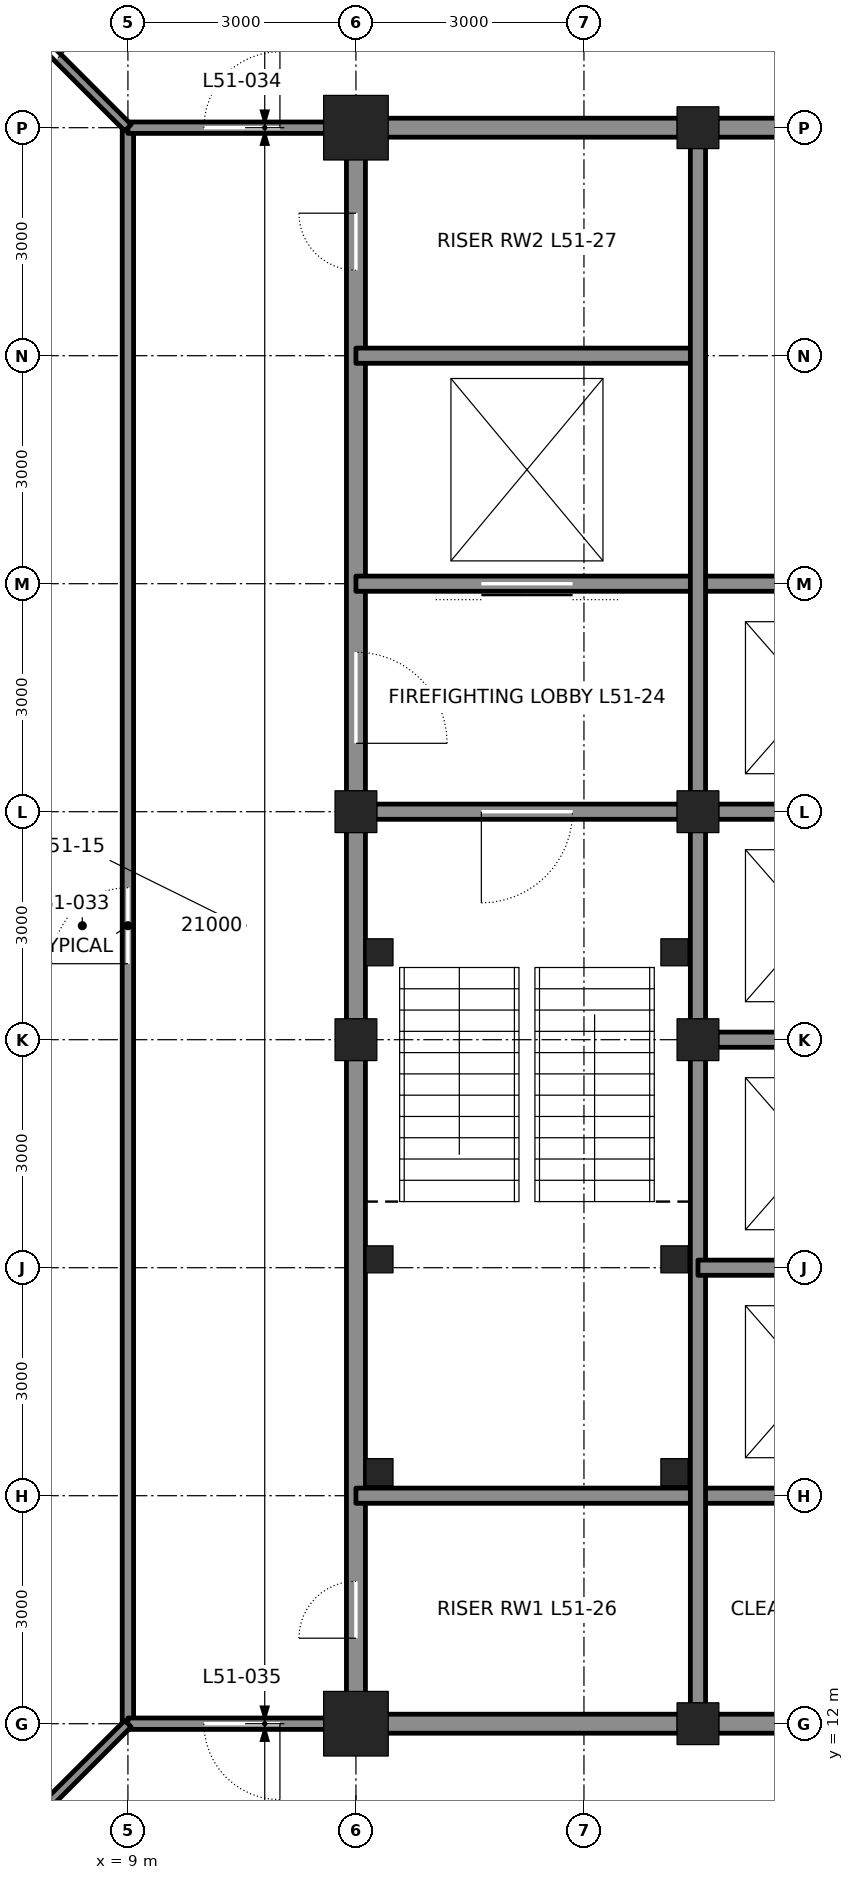
"""IFC4 building model, lengths in metres.
Left out: names, types, materials, properties, quantities, classifications, styles, units other than length and angle.
Written with IfcOpenShell. Run it as: python <this file> out.ifc"""

import sys

from ifc_helpers import new_model, si_unit, direction, frame, frame_2d, origin, origin_2d, place, context, subcontext, project, spatial, rectangle, hollow_rectangle, extrude, element, fill, save


model = new_model("IFC4")
c1 = context("Model", 3, precision=1e-05, world=origin(), true_north=direction((0.0, 1.0)))
c2 = subcontext(c1, "Body", "Model", "MODEL_VIEW")
j1 = project(units=[si_unit("LENGTHUNIT", "METRE"), si_unit("PLANEANGLEUNIT", "RADIAN")], contexts=[c1])
p1 = place(None, origin())
s1 = spatial("IfcSite", under=j1, at=p1, CompositionType="ELEMENT")
p2 = place(p1, origin())
s2 = spatial("IfcBuilding", under=s1, at=p2, CompositionType="ELEMENT")
p3 = place(p2, frame((0.0, 0.0, 230.7)))
s3 = spatial("IfcBuildingStorey", under=s2, at=p3, CompositionType="ELEMENT", Elevation=230.7)
p4 = place(p3, frame((12.0, 12.0, 0.0), z_axis=(0.0, 0.0, 1.0), x_axis=(1.0, 0.0, 0.0)))
e1 = element("IfcColumn", 1, at=p4, inside=s3, PredefinedType="COLUMN", context=c2, shape_type="SweptSolid", body=[
    extrude(hollow_rectangle(XDim=0.85, YDim=0.85, WallThickness=0.085, at=origin_2d()), origin(), (0.0, 0.0, 1.0), 4.2),
])
p5 = place(p3, frame((16.5, 12.0, 0.0), z_axis=(0.0, 0.0, 1.0), x_axis=(1.0, 0.0, 0.0)))
e2 = element("IfcColumn", 2, at=p5, inside=s3, PredefinedType="COLUMN", context=c2, shape_type="SweptSolid", body=[
    extrude(hollow_rectangle(XDim=0.55, YDim=0.55, WallThickness=0.045, at=origin_2d()), origin(), (0.0, 0.0, 1.0), 4.2),
])
p6 = place(p3, frame((12.0, 33.0, 0.0), z_axis=(0.0, 0.0, 1.0), x_axis=(1.0, 0.0, 0.0)))
e3 = element("IfcColumn", 3, at=p6, inside=s3, PredefinedType="COLUMN", context=c2, shape_type="SweptSolid", body=[
    extrude(hollow_rectangle(XDim=0.85, YDim=0.85, WallThickness=0.085, at=origin_2d()), origin(), (0.0, 0.0, 1.0), 4.2),
])
for number, where, z_axis, x_axis in (
    (4, (16.5, 33.0, 0.0), (0.0, 0.0, 1.0), (1.0, 0.0, 0.0)),
    (5, (12.0, 21.0, 0.0), (0.0, 0.0, 1.0), (1.0, 0.0, 0.0)),
    (6, (12.0, 24.0, 0.0), (0.0, 0.0, 1.0), (1.0, 0.0, 0.0)),
    (7, (16.5, 21.0, 0.0), (0.0, 0.0, 1.0), (1.0, 0.0, 0.0)),
    (8, (16.5, 24.0, 0.0), (0.0, 0.0, 1.0), (1.0, 0.0, 0.0)),
):
    element("IfcColumn", number, at=place(p3, frame(where, z_axis=z_axis, x_axis=x_axis)), inside=s3, PredefinedType="COLUMN", context=c2, shape_type="SweptSolid", body=[
        extrude(hollow_rectangle(XDim=0.55, YDim=0.55, WallThickness=0.045, at=origin_2d()), origin(), (0.0, 0.0, 1.0), 4.2),
    ])
p7 = place(p3, frame((12.0, 12.25, 0.0), z_axis=(0.0, 0.0, 1.0), x_axis=(0.0, 1.0, 0.0)))
e9 = element("IfcWall", 9, at=p7, inside=s3, PredefinedType="SOLIDWALL", context=c2, shape_type="SweptSolid", body=[
    extrude(rectangle(XDim=8.5, YDim=0.25, at=frame_2d((4.25, 0.0))), origin(), (0.0, 0.0, 1.0), 3.113),
])
p8 = place(p7, frame((0.875, 0.0, 0.0)))
e10 = element("IfcOpeningElement", 10, at=p8, cuts=e9, PredefinedType="OPENING", context=c2, shape_type="SweptSolid", body=[
    extrude(rectangle(XDim=0.75, YDim=2.1, at=frame_2d((0.375, 1.05))), frame((0.0, 0.135, 0.0), z_axis=(0.0, -1.0, 0.0), x_axis=(1.0, 0.0, 0.0)), (0.0, 0.0, 1.0), 0.27),
])
p9 = place(p3, frame((12.0, 21.25, 0.0), z_axis=(0.0, 0.0, 1.0), x_axis=(0.0, 1.0, 0.0)))
e11 = element("IfcWall", 11, at=p9, inside=s3, PredefinedType="SOLIDWALL", context=c2, shape_type="SweptSolid", body=[
    extrude(rectangle(XDim=2.5, YDim=0.25, at=frame_2d((1.25, 0.0))), origin(), (0.0, 0.0, 1.0), 3.113),
])
p10 = place(p3, frame((12.0, 24.25, 0.0), z_axis=(0.0, 0.0, 1.0), x_axis=(0.0, 1.0, 0.0)))
e12 = element("IfcWall", 12, at=p10, inside=s3, PredefinedType="SOLIDWALL", context=c2, shape_type="SweptSolid", body=[
    extrude(rectangle(XDim=8.5, YDim=0.25, at=frame_2d((4.25, 0.0))), origin(), (0.0, 0.0, 1.0), 3.113),
])
p11 = place(p10, frame((0.65, 0.0, 0.0)))
e13 = element("IfcOpeningElement", 13, at=p11, cuts=e12, PredefinedType="OPENING", context=c2, shape_type="SweptSolid", body=[
    extrude(rectangle(XDim=1.2, YDim=2.1, at=frame_2d((0.6, 1.05))), frame((0.0, 0.135, 0.0), z_axis=(0.0, -1.0, 0.0), x_axis=(1.0, 0.0, 0.0)), (0.0, 0.0, 1.0), 0.27),
])
p12 = place(p10, frame((6.875, 0.0, 0.0)))
e14 = element("IfcOpeningElement", 14, at=p12, cuts=e12, PredefinedType="OPENING", context=c2, shape_type="SweptSolid", body=[
    extrude(rectangle(XDim=0.75, YDim=2.1, at=frame_2d((0.375, 1.05))), frame((0.0, 0.135, 0.0), z_axis=(0.0, -1.0, 0.0), x_axis=(1.0, 0.0, 0.0)), (0.0, 0.0, 1.0), 0.27),
])
p13 = place(p3, frame((12.25, 12.0, 0.0), z_axis=(0.0, 0.0, 1.0), x_axis=(1.0, 0.0, 0.0)))
e15 = element("IfcWall", 15, at=p13, inside=s3, PredefinedType="SOLIDWALL", context=c2, shape_type="SweptSolid", body=[
    extrude(rectangle(XDim=4.0, YDim=0.25, at=frame_2d((2.0, 0.0))), origin(), (0.0, 0.0, 1.0), 3.182),
])
p14 = place(p3, frame((16.75, 12.0, 0.0), z_axis=(0.0, 0.0, 1.0), x_axis=(1.0, 0.0, 0.0)))
e16 = element("IfcWall", 16, at=p14, inside=s3, PredefinedType="SOLIDWALL", context=c2, shape_type="SweptSolid", body=[
    extrude(rectangle(XDim=2.5, YDim=0.25, at=frame_2d((1.25, 0.0))), origin(), (0.0, 0.0, 1.0), 3.182),
])
p15 = place(p3, frame((12.0, 15.0, 0.0), z_axis=(0.0, 0.0, 1.0), x_axis=(1.0, 0.0, 0.0)))
e17 = element("IfcWall", 17, at=p15, inside=s3, PredefinedType="SOLIDWALL", context=c2, shape_type="SweptSolid", body=[
    extrude(rectangle(XDim=7.5, YDim=0.2, at=frame_2d((3.75, 0.0))), origin(), (0.0, 0.0, 1.0), 4.04),
])
p16 = place(p3, frame((12.25, 24.0, 0.0), z_axis=(0.0, 0.0, 1.0), x_axis=(1.0, 0.0, 0.0)))
e18 = element("IfcWall", 18, at=p16, inside=s3, PredefinedType="SOLIDWALL", context=c2, shape_type="SweptSolid", body=[
    extrude(rectangle(XDim=4.0, YDim=0.2, at=frame_2d((2.0, 0.0))), origin(), (0.0, 0.0, 1.0), 3.09),
])
p17 = place(p16, frame((1.4, 0.0, 0.0)))
e19 = element("IfcOpeningElement", 19, at=p17, cuts=e18, PredefinedType="OPENING", context=c2, shape_type="SweptSolid", body=[
    extrude(rectangle(XDim=1.2, YDim=2.1, at=frame_2d((0.6, 1.05))), frame((0.0, 0.11, 0.0), z_axis=(0.0, -1.0, 0.0), x_axis=(1.0, 0.0, 0.0)), (0.0, 0.0, 1.0), 0.22),
])
p18 = place(p3, frame((16.75, 24.0, 0.0), z_axis=(0.0, 0.0, 1.0), x_axis=(1.0, 0.0, 0.0)))
e20 = element("IfcWall", 20, at=p18, inside=s3, PredefinedType="SOLIDWALL", context=c2, shape_type="SweptSolid", body=[
    extrude(rectangle(XDim=2.75, YDim=0.2, at=frame_2d((1.375, 0.0))), origin(), (0.0, 0.0, 1.0), 3.09),
])
p19 = place(p3, frame((12.0, 27.0, 0.0), z_axis=(0.0, 0.0, 1.0), x_axis=(1.0, 0.0, 0.0)))
e21 = element("IfcWall", 21, at=p19, inside=s3, PredefinedType="SOLIDWALL", context=c2, shape_type="SweptSolid", body=[
    extrude(rectangle(XDim=7.5, YDim=0.2, at=frame_2d((3.75, 0.0))), origin(), (0.0, 0.0, 1.0), 4.04),
])
p20 = place(p19, frame((1.65, 0.0, 0.0)))
e22 = element("IfcOpeningElement", 22, at=p20, cuts=e21, PredefinedType="OPENING", context=c2, shape_type="SweptSolid", body=[
    extrude(rectangle(XDim=1.2, YDim=2.1, at=frame_2d((0.6, 1.05))), frame((0.0, 0.11, 0.0), z_axis=(0.0, -1.0, 0.0), x_axis=(1.0, 0.0, 0.0)), (0.0, 0.0, 1.0), 0.22),
])
p21 = place(p3, frame((12.0, 30.0, 0.0), z_axis=(0.0, 0.0, 1.0), x_axis=(1.0, 0.0, 0.0)))
e23 = element("IfcWall", 23, at=p21, inside=s3, PredefinedType="SOLIDWALL", context=c2, shape_type="SweptSolid", body=[
    extrude(rectangle(XDim=4.5, YDim=0.2, at=frame_2d((2.25, 0.0))), origin(), (0.0, 0.0, 1.0), 4.04),
])
p22 = place(p3, frame((12.25, 33.0, 0.0), z_axis=(0.0, 0.0, 1.0), x_axis=(1.0, 0.0, 0.0)))
e24 = element("IfcWall", 24, at=p22, inside=s3, PredefinedType="SOLIDWALL", context=c2, shape_type="SweptSolid", body=[
    extrude(rectangle(XDim=4.0, YDim=0.25, at=frame_2d((2.0, 0.0))), origin(), (0.0, 0.0, 1.0), 3.182),
])
p23 = place(p3, frame((16.75, 33.0, 0.0), z_axis=(0.0, 0.0, 1.0), x_axis=(1.0, 0.0, 0.0)))
e25 = element("IfcWall", 25, at=p23, inside=s3, PredefinedType="SOLIDWALL", context=c2, shape_type="SweptSolid", body=[
    extrude(rectangle(XDim=2.5, YDim=0.25, at=frame_2d((1.25, 0.0))), origin(), (0.0, 0.0, 1.0), 3.182),
])
p24 = place(p3, frame((16.5, 12.25, 0.0), z_axis=(0.0, 0.0, 1.0), x_axis=(0.0, 1.0, 0.0)))
e26 = element("IfcWall", 26, at=p24, inside=s3, PredefinedType="SOLIDWALL", context=c2, shape_type="SweptSolid", body=[
    extrude(rectangle(XDim=8.5, YDim=0.2, at=frame_2d((4.25, 0.0))), origin(), (0.0, 0.0, 1.0), 3.113),
])
p25 = place(p3, frame((16.5, 21.25, 0.0), z_axis=(0.0, 0.0, 1.0), x_axis=(0.0, 1.0, 0.0)))
e27 = element("IfcWall", 27, at=p25, inside=s3, PredefinedType="SOLIDWALL", context=c2, shape_type="SweptSolid", body=[
    extrude(rectangle(XDim=2.5, YDim=0.2, at=frame_2d((1.25, 0.0))), origin(), (0.0, 0.0, 1.0), 3.113),
])
p26 = place(p3, frame((16.5, 24.25, 0.0), z_axis=(0.0, 0.0, 1.0), x_axis=(0.0, 1.0, 0.0)))
e28 = element("IfcWall", 28, at=p26, inside=s3, PredefinedType="SOLIDWALL", context=c2, shape_type="SweptSolid", body=[
    extrude(rectangle(XDim=8.5, YDim=0.2, at=frame_2d((4.25, 0.0))), origin(), (0.0, 0.0, 1.0), 3.113),
])
p27 = place(p3, frame((16.5, 18.0, 0.0), z_axis=(0.0, 0.0, 1.0), x_axis=(1.0, 0.0, 0.0)))
e29 = element("IfcWall", 29, at=p27, inside=s3, PredefinedType="SOLIDWALL", context=c2, shape_type="SweptSolid", body=[
    extrude(rectangle(XDim=3.0, YDim=0.2, at=frame_2d((1.5, 0.0))), origin(), (0.0, 0.0, 1.0), 4.04),
])
p28 = place(p3, frame((16.75, 21.0, 0.0), z_axis=(0.0, 0.0, 1.0), x_axis=(1.0, 0.0, 0.0)))
e30 = element("IfcWall", 30, at=p28, inside=s3, PredefinedType="SOLIDWALL", context=c2, shape_type="SweptSolid", body=[
    extrude(rectangle(XDim=2.75, YDim=0.2, at=frame_2d((1.375, 0.0))), origin(), (0.0, 0.0, 1.0), 3.09),
])
p29 = place(p3, frame((9.0, 12.0, 0.0), z_axis=(0.0, 0.0, 1.0), x_axis=(0.0, 1.0, 0.0)))
e31 = element("IfcWall", 31, at=p29, inside=s3, PredefinedType="PARTITIONING", context=c2, shape_type="SweptSolid", body=[
    extrude(rectangle(XDim=21.0, YDim=0.15, at=frame_2d((10.5, 0.0))), origin(), (0.0, 0.0, 1.0), 4.04),
])
p30 = place(p29, frame((10.0, 0.0, 0.0)))
e32 = element("IfcOpeningElement", 32, at=p30, cuts=e31, PredefinedType="OPENING", context=c2, shape_type="SweptSolid", body=[
    extrude(rectangle(XDim=1.0, YDim=2.4, at=frame_2d((0.5, 1.2))), frame((0.0, 0.085, 0.0), z_axis=(0.0, -1.0, 0.0), x_axis=(1.0, 0.0, 0.0)), (0.0, 0.0, 1.0), 0.17),
])
p31 = place(p3, frame((9.0, 33.0, 0.0), z_axis=(0.0, 0.0, 1.0), x_axis=(1.0, 0.0, 0.0)))
e33 = element("IfcWall", 33, at=p31, inside=s3, PredefinedType="PARTITIONING", context=c2, shape_type="SweptSolid", body=[
    extrude(rectangle(XDim=3.0, YDim=0.15, at=frame_2d((1.5, 0.0))), origin(), (0.0, 0.0, 1.0), 3.271),
])
p32 = place(p31, frame((1.0, 0.0, 0.0)))
e34 = element("IfcOpeningElement", 34, at=p32, cuts=e33, PredefinedType="OPENING", context=c2, shape_type="SweptSolid", body=[
    extrude(rectangle(XDim=1.0, YDim=2.4, at=frame_2d((0.5, 1.2))), frame((0.0, 0.085, 0.0), z_axis=(0.0, -1.0, 0.0), x_axis=(1.0, 0.0, 0.0)), (0.0, 0.0, 1.0), 0.17),
])
p33 = place(p3, frame((9.0, 12.0, 0.0), z_axis=(0.0, 0.0, 1.0), x_axis=(1.0, 0.0, 0.0)))
e35 = element("IfcWall", 35, at=p33, inside=s3, PredefinedType="PARTITIONING", context=c2, shape_type="SweptSolid", body=[
    extrude(rectangle(XDim=3.0, YDim=0.15, at=frame_2d((1.5, 0.0))), origin(), (0.0, 0.0, 1.0), 3.271),
])
p34 = place(p33, frame((1.0, 0.0, 0.0)))
e36 = element("IfcOpeningElement", 36, at=p34, cuts=e35, PredefinedType="OPENING", context=c2, shape_type="SweptSolid", body=[
    extrude(rectangle(XDim=1.0, YDim=2.4, at=frame_2d((0.5, 1.2))), frame((0.0, 0.085, 0.0), z_axis=(0.0, -1.0, 0.0), x_axis=(1.0, 0.0, 0.0)), (0.0, 0.0, 1.0), 0.17),
])
p35 = place(p3, frame((9.0, 33.0, 0.0), z_axis=(0.0, 0.0, 1.0), x_axis=(-0.707106781187, 0.707106781187, 0.0)))
e37 = element("IfcWall", 37, at=p35, inside=s3, PredefinedType="PARTITIONING", context=c2, shape_type="SweptSolid", body=[
    extrude(rectangle(XDim=5.732, YDim=0.12, at=frame_2d((2.866, 0.0))), origin(), (0.0, 0.0, 1.0), 4.04),
])
p36 = place(p35, frame((1.3, 0.0, 0.0)))
e38 = element("IfcOpeningElement", 38, at=p36, cuts=e37, PredefinedType="OPENING", context=c2, shape_type="SweptSolid", body=[
    extrude(rectangle(XDim=1.0, YDim=2.4, at=frame_2d((0.5, 1.2))), frame((0.0, 0.07, 0.0), z_axis=(0.0, -1.0, 0.0), x_axis=(1.0, 0.0, 0.0)), (0.0, 0.0, 1.0), 0.14),
])
p37 = place(p3, frame((9.0, 12.0, 0.0), z_axis=(0.0, 0.0, 1.0), x_axis=(-0.707106781187, -0.707106781187, 0.0)))
e39 = element("IfcWall", 39, at=p37, inside=s3, PredefinedType="PARTITIONING", context=c2, shape_type="SweptSolid", body=[
    extrude(rectangle(XDim=1.489, YDim=0.12, at=frame_2d((0.745, 0.0))), origin(), (0.0, 0.0, 1.0), 4.04),
])
for number, where, z_axis, x_axis in (
    (40, (12.31, 15.31, 0.0), (0.0, 0.0, 1.0), (1.0, 0.0, 0.0)),
    (41, (16.19, 15.31, 0.0), (0.0, 0.0, 1.0), (1.0, 0.0, 0.0)),
    (42, (12.31, 18.11, 0.0), (0.0, 0.0, 1.0), (1.0, 0.0, 0.0)),
    (43, (16.19, 18.11, 0.0), (0.0, 0.0, 1.0), (1.0, 0.0, 0.0)),
    (44, (12.31, 22.15, 0.0), (0.0, 0.0, 1.0), (1.0, 0.0, 0.0)),
    (45, (16.19, 22.15, 0.0), (0.0, 0.0, 1.0), (1.0, 0.0, 0.0)),
):
    element("IfcColumn", number, at=place(p3, frame(where, z_axis=z_axis, x_axis=x_axis)), inside=s3, PredefinedType="COLUMN", context=c2, shape_type="SweptSolid", body=[
        extrude(hollow_rectangle(XDim=0.356, YDim=0.356, WallThickness=0.009, at=origin_2d()), origin(), (0.0, 0.0, 1.0), 4.2),
    ])
p38 = place(p17, frame((1.2, 0.0, 0.0), z_axis=(0.0, 0.0, 1.0), x_axis=(-1.0, 0.0, 0.0)))
e46 = element("IfcDoor", 46, at=p38, inside=s3, OperationType="SINGLE_SWING_RIGHT", PredefinedType="DOOR", context=c2, shape_type="SweptSolid", body=[
    extrude(rectangle(XDim=1.2, YDim=2.1, at=frame_2d((0.6, 1.05))), frame((0.0, 0.025, 0.0), z_axis=(0.0, -1.0, 0.0), x_axis=(1.0, 0.0, 0.0)), (0.0, 0.0, 1.0), 0.05),
])
fill(e19, e46)
p39 = place(p11, frame((1.2, 0.0, 0.0), z_axis=(0.0, 0.0, 1.0), x_axis=(-1.0, 0.0, 0.0)))
e47 = element("IfcDoor", 47, at=p39, inside=s3, OperationType="SINGLE_SWING_RIGHT", PredefinedType="DOOR", context=c2, shape_type="SweptSolid", body=[
    extrude(rectangle(XDim=1.2, YDim=2.1, at=frame_2d((0.6, 1.05))), frame((0.0, 0.025, 0.0), z_axis=(0.0, -1.0, 0.0), x_axis=(1.0, 0.0, 0.0)), (0.0, 0.0, 1.0), 0.05),
])
fill(e13, e47)
p40 = place(p20, origin())
e48 = element("IfcDoor", 48, at=p40, inside=s3, OperationType="DOUBLE_DOOR_SLIDING", PredefinedType="DOOR", context=c2, shape_type="SweptSolid", body=[
    extrude(rectangle(XDim=1.2, YDim=2.1, at=frame_2d((0.6, 1.05))), frame((0.0, 0.025, 0.0), z_axis=(0.0, -1.0, 0.0), x_axis=(1.0, 0.0, 0.0)), (0.0, 0.0, 1.0), 0.05),
])
fill(e22, e48)
p41 = place(p8, origin())
e49 = element("IfcDoor", 49, at=p41, inside=s3, OperationType="SINGLE_SWING_LEFT", PredefinedType="DOOR", context=c2, shape_type="SweptSolid", body=[
    extrude(rectangle(XDim=0.75, YDim=2.1, at=frame_2d((0.375, 1.05))), frame((0.0, 0.025, 0.0), z_axis=(0.0, -1.0, 0.0), x_axis=(1.0, 0.0, 0.0)), (0.0, 0.0, 1.0), 0.05),
])
fill(e10, e49)
p42 = place(p12, origin())
e50 = element("IfcDoor", 50, at=p42, inside=s3, OperationType="SINGLE_SWING_RIGHT", PredefinedType="DOOR", context=c2, shape_type="SweptSolid", body=[
    extrude(rectangle(XDim=0.75, YDim=2.1, at=frame_2d((0.375, 1.05))), frame((0.0, 0.025, 0.0), z_axis=(0.0, -1.0, 0.0), x_axis=(1.0, 0.0, 0.0)), (0.0, 0.0, 1.0), 0.05),
])
fill(e14, e50)
p43 = place(p30, origin())
e51 = element("IfcDoor", 51, at=p43, inside=s3, OperationType="SINGLE_SWING_LEFT", PredefinedType="DOOR", context=c2, shape_type="SweptSolid", body=[
    extrude(rectangle(XDim=1.0, YDim=2.4, at=frame_2d((0.5, 1.2))), frame((0.0, 0.025, 0.0), z_axis=(0.0, -1.0, 0.0), x_axis=(1.0, 0.0, 0.0)), (0.0, 0.0, 1.0), 0.05),
])
fill(e32, e51)
p44 = place(p32, origin())
e52 = element("IfcDoor", 52, at=p44, inside=s3, OperationType="SINGLE_SWING_RIGHT", PredefinedType="DOOR", context=c2, shape_type="SweptSolid", body=[
    extrude(rectangle(XDim=1.0, YDim=2.4, at=frame_2d((0.5, 1.2))), frame((0.0, 0.025, 0.0), z_axis=(0.0, -1.0, 0.0), x_axis=(1.0, 0.0, 0.0)), (0.0, 0.0, 1.0), 0.05),
])
fill(e34, e52)
p45 = place(p34, frame((1.0, 0.0, 0.0), z_axis=(0.0, 0.0, 1.0), x_axis=(-1.0, 0.0, 0.0)))
e53 = element("IfcDoor", 53, at=p45, inside=s3, OperationType="SINGLE_SWING_LEFT", PredefinedType="DOOR", context=c2, shape_type="SweptSolid", body=[
    extrude(rectangle(XDim=1.0, YDim=2.4, at=frame_2d((0.5, 1.2))), frame((0.0, 0.025, 0.0), z_axis=(0.0, -1.0, 0.0), x_axis=(1.0, 0.0, 0.0)), (0.0, 0.0, 1.0), 0.05),
])
fill(e36, e53)
p46 = place(p36, frame((1.0, 0.0, 0.0), z_axis=(0.0, 0.0, 1.0), x_axis=(-1.0, 0.0, 0.0)))
e54 = element("IfcDoor", 54, at=p46, inside=s3, OperationType="SINGLE_SWING_RIGHT", PredefinedType="DOOR", context=c2, shape_type="SweptSolid", body=[
    extrude(rectangle(XDim=1.0, YDim=2.4, at=frame_2d((0.5, 1.2))), frame((0.0, 0.025, 0.0), z_axis=(0.0, -1.0, 0.0), x_axis=(1.0, 0.0, 0.0)), (0.0, 0.0, 1.0), 0.05),
])
fill(e38, e54)
save(model, sys.argv[1])
